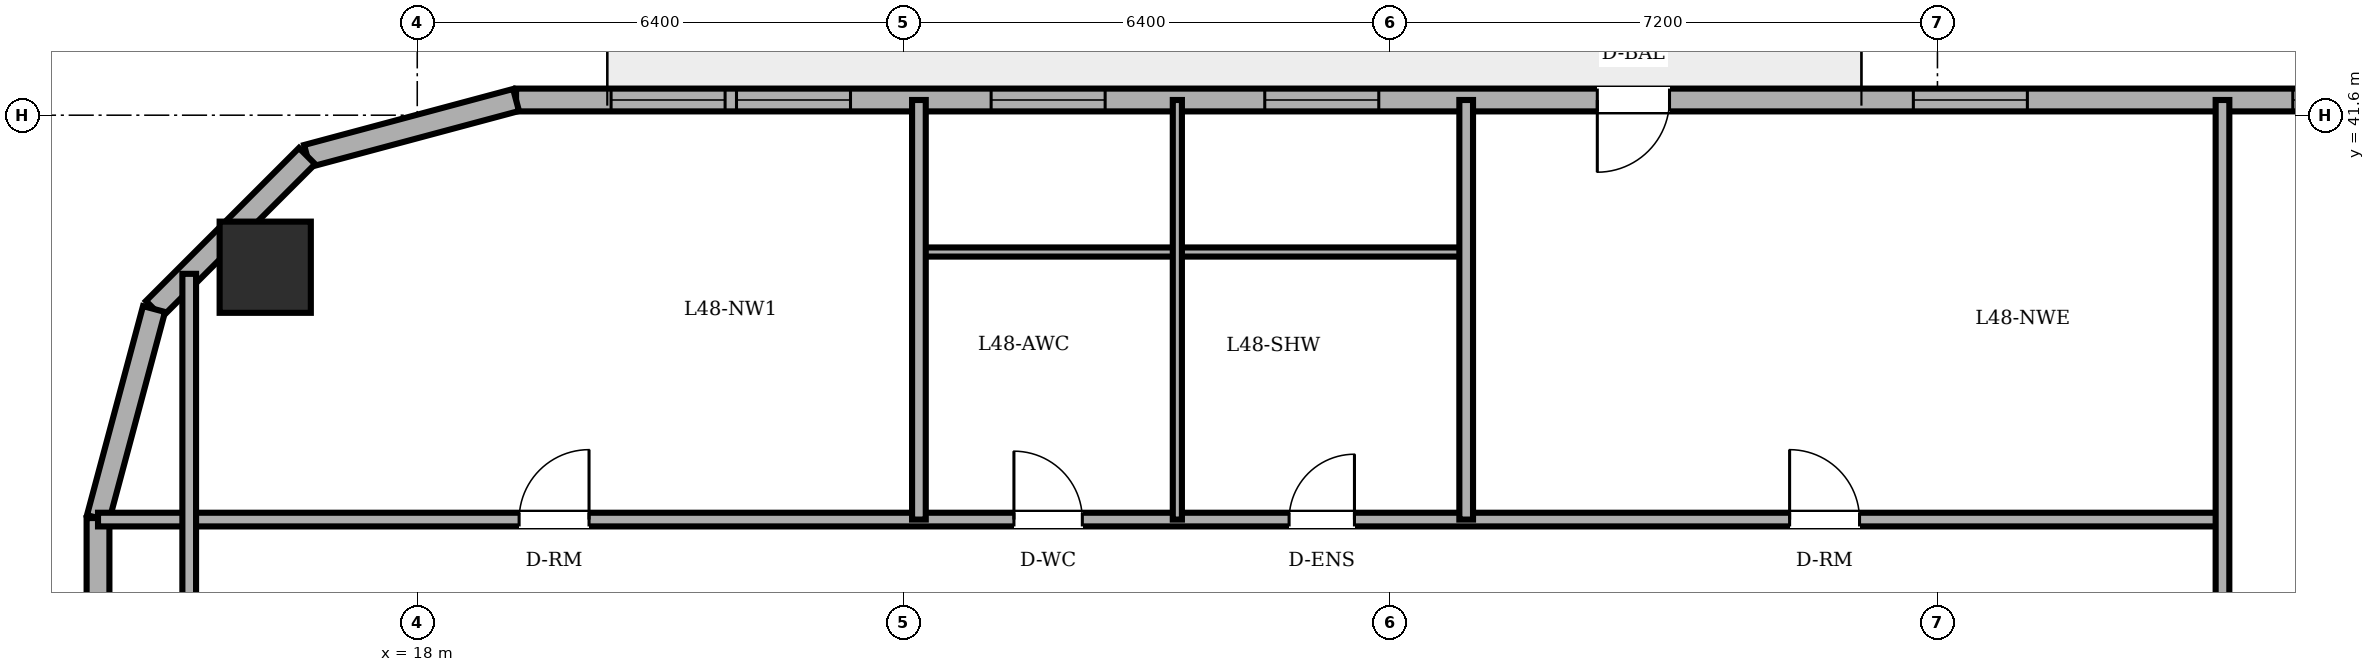
"""IFC4 building model, lengths in metres.
Left out: names, types, materials, properties, quantities, classifications, styles, units other than length and angle.
Written with IfcOpenShell. Run it as: python <this file> out.ifc"""

import sys

from ifc_helpers import new_model, si_unit, direction, frame, frame_2d, origin, origin_2d, place, context, subcontext, project, spatial, rectangle, circle, extrude, element, fill, save


model = new_model("IFC4")
c1 = context("Model", 3, precision=1e-05, world=origin(), true_north=direction((0.0, 1.0)))
c2 = subcontext(c1, "Body", "Model", "MODEL_VIEW")
j1 = project(units=[si_unit("LENGTHUNIT", "METRE"), si_unit("PLANEANGLEUNIT", "RADIAN")], contexts=[c1])
p1 = place(None, origin())
s1 = spatial("IfcSite", under=j1, at=p1, CompositionType="ELEMENT")
p2 = place(p1, origin())
s2 = spatial("IfcBuilding", under=s1, at=p2, CompositionType="ELEMENT")
p3 = place(p2, frame((0.0, 0.0, 183.4)))
s3 = spatial("IfcBuildingStorey", under=s2, at=p3, CompositionType="ELEMENT", Elevation=183.4)
p4 = place(p3, frame((16.0, 39.6, 0.0), z_axis=(0.0, 0.0, 1.0), x_axis=(1.0, 0.0, 0.0)))
e1 = element("IfcColumn", 1, at=p4, inside=s3, PredefinedType="COLUMN", context=c2, shape_type="SweptSolid", body=[
    extrude(circle(Radius=0.6, at=origin_2d()), origin(), (0.0, 0.0, 1.0), 3.6),
])
p5 = place(p3, frame((49.582, 41.8, 0.0), z_axis=(0.0, 0.0, 1.0), x_axis=(-1.0, 0.0, 0.0)))
e2 = element("IfcWall", 2, at=p5, inside=s3, PredefinedType="SOLIDWALL", context=c2, shape_type="SweptSolid", body=[
    extrude(rectangle(XDim=30.282, YDim=0.3, at=frame_2d((15.141, 0.0))), origin(), (0.0, 0.0, 1.0), 3.4),
])
p6 = place(p5, frame((15.107, 0.0, 0.0)))
e3 = element("IfcOpeningElement", 3, at=p6, cuts=e2, PredefinedType="OPENING", context=c2, shape_type="SweptSolid", body=[
    extrude(rectangle(XDim=0.95, YDim=2.2, at=frame_2d((0.475, 1.1))), frame((0.0, 0.16, 0.0), z_axis=(0.0, -1.0, 0.0), x_axis=(1.0, 0.0, 0.0)), (0.0, 0.0, 1.0), 0.32),
])
p7 = place(p5, frame((0.828, 0.0, 0.85)))
e4 = element("IfcOpeningElement", 4, at=p7, cuts=e2, PredefinedType="OPENING", context=c2, shape_type="SweptSolid", body=[
    extrude(rectangle(XDim=1.5, YDim=1.55, at=frame_2d((0.75, 0.775))), frame((0.0, 0.16, 0.0), z_axis=(0.0, -1.0, 0.0), x_axis=(1.0, 0.0, 0.0)), (0.0, 0.0, 1.0), 0.32),
])
p8 = place(p5, frame((3.731, 0.0, 0.85)))
e5 = element("IfcOpeningElement", 5, at=p8, cuts=e2, PredefinedType="OPENING", context=c2, shape_type="SweptSolid", body=[
    extrude(rectangle(XDim=1.5, YDim=1.55, at=frame_2d((0.75, 0.775))), frame((0.0, 0.16, 0.0), z_axis=(0.0, -1.0, 0.0), x_axis=(1.0, 0.0, 0.0)), (0.0, 0.0, 1.0), 0.32),
])
p9 = place(p5, frame((5.407, 0.0, 0.85)))
e6 = element("IfcOpeningElement", 6, at=p9, cuts=e2, PredefinedType="OPENING", context=c2, shape_type="SweptSolid", body=[
    extrude(rectangle(XDim=1.5, YDim=1.55, at=frame_2d((0.75, 0.775))), frame((0.0, 0.16, 0.0), z_axis=(0.0, -1.0, 0.0), x_axis=(1.0, 0.0, 0.0)), (0.0, 0.0, 1.0), 0.32),
])
p10 = place(p5, frame((10.399, 0.0, 0.85)))
e7 = element("IfcOpeningElement", 7, at=p10, cuts=e2, PredefinedType="OPENING", context=c2, shape_type="SweptSolid", body=[
    extrude(rectangle(XDim=1.5, YDim=1.55, at=frame_2d((0.75, 0.775))), frame((0.0, 0.16, 0.0), z_axis=(0.0, -1.0, 0.0), x_axis=(1.0, 0.0, 0.0)), (0.0, 0.0, 1.0), 0.32),
])
p11 = place(p5, frame((18.932, 0.0, 0.85)))
e8 = element("IfcOpeningElement", 8, at=p11, cuts=e2, PredefinedType="OPENING", context=c2, shape_type="SweptSolid", body=[
    extrude(rectangle(XDim=1.5, YDim=1.55, at=frame_2d((0.75, 0.775))), frame((0.0, 0.16, 0.0), z_axis=(0.0, -1.0, 0.0), x_axis=(1.0, 0.0, 0.0)), (0.0, 0.0, 1.0), 0.32),
])
p12 = place(p5, frame((22.532, 0.0, 0.85)))
e9 = element("IfcOpeningElement", 9, at=p12, cuts=e2, PredefinedType="OPENING", context=c2, shape_type="SweptSolid", body=[
    extrude(rectangle(XDim=1.5, YDim=1.55, at=frame_2d((0.75, 0.775))), frame((0.0, 0.16, 0.0), z_axis=(0.0, -1.0, 0.0), x_axis=(1.0, 0.0, 0.0)), (0.0, 0.0, 1.0), 0.32),
])
p13 = place(p5, frame((25.882, 0.0, 0.85)))
e10 = element("IfcOpeningElement", 10, at=p13, cuts=e2, PredefinedType="OPENING", context=c2, shape_type="SweptSolid", body=[
    extrude(rectangle(XDim=1.5, YDim=1.55, at=frame_2d((0.75, 0.775))), frame((0.0, 0.16, 0.0), z_axis=(0.0, -1.0, 0.0), x_axis=(1.0, 0.0, 0.0)), (0.0, 0.0, 1.0), 0.32),
])
p14 = place(p5, frame((27.532, 0.0, 0.85)))
e11 = element("IfcOpeningElement", 11, at=p14, cuts=e2, PredefinedType="OPENING", context=c2, shape_type="SweptSolid", body=[
    extrude(rectangle(XDim=1.5, YDim=1.55, at=frame_2d((0.75, 0.775))), frame((0.0, 0.16, 0.0), z_axis=(0.0, -1.0, 0.0), x_axis=(1.0, 0.0, 0.0)), (0.0, 0.0, 1.0), 0.32),
])
p15 = place(p3, frame((19.3, 41.8, 0.0), z_axis=(0.0, 0.0, 1.0), x_axis=(-0.965908238586, -0.258884674387, 0.0)))
e12 = element("IfcWall", 12, at=p15, inside=s3, PredefinedType="SOLIDWALL", context=c2, shape_type="SweptSolid", body=[
    extrude(rectangle(XDim=2.847, YDim=0.3, at=frame_2d((1.424, 0.0))), origin(), (0.0, 0.0, 1.0), 3.4),
])
p16 = place(p3, frame((16.55, 41.063, 0.0), z_axis=(0.0, 0.0, 1.0), x_axis=(-0.707106781187, -0.707106781187, 0.0)))
e13 = element("IfcWall", 13, at=p16, inside=s3, PredefinedType="SOLIDWALL", context=c2, shape_type="SweptSolid", body=[
    extrude(rectangle(XDim=2.847, YDim=0.3, at=frame_2d((1.423, 0.0))), origin(), (0.0, 0.0, 1.0), 3.4),
])
p17 = place(p3, frame((14.537, 39.05, 0.0), z_axis=(0.0, 0.0, 1.0), x_axis=(-0.258884674387, -0.965908238586, 0.0)))
e14 = element("IfcWall", 14, at=p17, inside=s3, PredefinedType="SOLIDWALL", context=c2, shape_type="SweptSolid", body=[
    extrude(rectangle(XDim=2.847, YDim=0.3, at=frame_2d((1.424, 0.0))), origin(), (0.0, 0.0, 1.0), 3.4),
])
p18 = place(p3, frame((13.8, 36.3, 0.0), z_axis=(0.0, 0.0, 1.0), x_axis=(0.0, -1.0, 0.0)))
e15 = element("IfcWall", 15, at=p18, inside=s3, PredefinedType="SOLIDWALL", context=c2, shape_type="SweptSolid", body=[
    extrude(rectangle(XDim=24.6, YDim=0.3, at=frame_2d((12.3, 0.0))), origin(), (0.0, 0.0, 1.0), 3.4),
])
p19 = place(p18, frame((5.003, 0.0, 0.85)))
e16 = element("IfcOpeningElement", 16, at=p19, cuts=e15, PredefinedType="OPENING", context=c2, shape_type="SweptSolid", body=[
    extrude(rectangle(XDim=1.5, YDim=1.55, at=frame_2d((0.75, 0.775))), frame((0.0, 0.16, 0.0), z_axis=(0.0, -1.0, 0.0), x_axis=(1.0, 0.0, 0.0)), (0.0, 0.0, 1.0), 0.32),
])
p20 = place(p18, frame((8.277, 0.0, 0.85)))
e17 = element("IfcOpeningElement", 17, at=p20, cuts=e15, PredefinedType="OPENING", context=c2, shape_type="SweptSolid", body=[
    extrude(rectangle(XDim=1.5, YDim=1.55, at=frame_2d((0.75, 0.775))), frame((0.0, 0.16, 0.0), z_axis=(0.0, -1.0, 0.0), x_axis=(1.0, 0.0, 0.0)), (0.0, 0.0, 1.0), 0.32),
])
p21 = place(p18, frame((14.823, 0.0, 0.85)))
e18 = element("IfcOpeningElement", 18, at=p21, cuts=e15, PredefinedType="OPENING", context=c2, shape_type="SweptSolid", body=[
    extrude(rectangle(XDim=1.5, YDim=1.55, at=frame_2d((0.75, 0.775))), frame((0.0, 0.16, 0.0), z_axis=(0.0, -1.0, 0.0), x_axis=(1.0, 0.0, 0.0)), (0.0, 0.0, 1.0), 0.32),
])
p22 = place(p18, frame((18.097, 0.0, 0.85)))
e19 = element("IfcOpeningElement", 19, at=p22, cuts=e15, PredefinedType="OPENING", context=c2, shape_type="SweptSolid", body=[
    extrude(rectangle(XDim=1.5, YDim=1.55, at=frame_2d((0.75, 0.775))), frame((0.0, 0.16, 0.0), z_axis=(0.0, -1.0, 0.0), x_axis=(1.0, 0.0, 0.0)), (0.0, 0.0, 1.0), 0.32),
])
p23 = place(p3, frame((13.8, 36.28, 0.0), z_axis=(0.0, 0.0, 1.0), x_axis=(1.0, 0.0, 0.0)))
e20 = element("IfcWall", 20, at=p23, inside=s3, PredefinedType="PARTITIONING", context=c2, shape_type="SweptSolid", body=[
    extrude(rectangle(XDim=27.95, YDim=0.18, at=frame_2d((13.975, 0.0))), origin(), (0.0, 0.0, 1.0), 3.4),
])
p24 = place(p23, frame((12.05, 0.0, 0.0)))
e21 = element("IfcOpeningElement", 21, at=p24, cuts=e20, PredefinedType="OPENING", context=c2, shape_type="SweptSolid", body=[
    extrude(rectangle(XDim=0.9, YDim=2.1, at=frame_2d((0.45, 1.05))), frame((0.0, 0.1, 0.0), z_axis=(0.0, -1.0, 0.0), x_axis=(1.0, 0.0, 0.0)), (0.0, 0.0, 1.0), 0.2),
])
p25 = place(p23, frame((15.67, 0.0, 0.0)))
e22 = element("IfcOpeningElement", 22, at=p25, cuts=e20, PredefinedType="OPENING", context=c2, shape_type="SweptSolid", body=[
    extrude(rectangle(XDim=0.86, YDim=2.1, at=frame_2d((0.43, 1.05))), frame((0.0, 0.1, 0.0), z_axis=(0.0, -1.0, 0.0), x_axis=(1.0, 0.0, 0.0)), (0.0, 0.0, 1.0), 0.2),
])
p26 = place(p23, frame((5.54, 0.0, 0.0)))
e23 = element("IfcOpeningElement", 23, at=p26, cuts=e20, PredefinedType="OPENING", context=c2, shape_type="SweptSolid", body=[
    extrude(rectangle(XDim=0.92, YDim=2.1, at=frame_2d((0.46, 1.05))), frame((0.0, 0.1, 0.0), z_axis=(0.0, -1.0, 0.0), x_axis=(1.0, 0.0, 0.0)), (0.0, 0.0, 1.0), 0.2),
])
p27 = place(p23, frame((22.255, 0.0, 0.0)))
e24 = element("IfcOpeningElement", 24, at=p27, cuts=e20, PredefinedType="OPENING", context=c2, shape_type="SweptSolid", body=[
    extrude(rectangle(XDim=0.92, YDim=2.1, at=frame_2d((0.46, 1.05))), frame((0.0, 0.1, 0.0), z_axis=(0.0, -1.0, 0.0), x_axis=(1.0, 0.0, 0.0)), (0.0, 0.0, 1.0), 0.2),
])
p28 = place(p3, frame((24.6, 39.8, 0.0), z_axis=(0.0, 0.0, 1.0), x_axis=(1.0, 0.0, 0.0)))
e25 = element("IfcWall", 25, at=p28, inside=s3, PredefinedType="PARTITIONING", context=c2, shape_type="SweptSolid", body=[
    extrude(rectangle(XDim=7.2, YDim=0.12, at=frame_2d((3.6, 0.0))), origin(), (0.0, 0.0, 1.0), 2.882),
])
p29 = place(p3, frame((15.0, 33.82, 0.0), z_axis=(0.0, 0.0, 1.0), x_axis=(0.0, 1.0, 0.0)))
e26 = element("IfcWall", 26, at=p29, inside=s3, PredefinedType="PARTITIONING", context=c2, shape_type="SweptSolid", body=[
    extrude(rectangle(XDim=5.693, YDim=0.18, at=frame_2d((2.846, 0.0))), origin(), (0.0, 0.0, 1.0), 3.4),
])
p30 = place(p3, frame((24.6, 36.28, 0.0), z_axis=(0.0, 0.0, 1.0), x_axis=(0.0, 1.0, 0.0)))
e27 = element("IfcWall", 27, at=p30, inside=s3, PredefinedType="PARTITIONING", context=c2, shape_type="SweptSolid", body=[
    extrude(rectangle(XDim=5.52, YDim=0.18, at=frame_2d((2.76, 0.0))), origin(), (0.0, 0.0, 1.0), 3.4),
])
p31 = place(p3, frame((28.0, 36.28, 0.0), z_axis=(0.0, 0.0, 1.0), x_axis=(0.0, 1.0, 0.0)))
e28 = element("IfcWall", 28, at=p31, inside=s3, PredefinedType="PARTITIONING", context=c2, shape_type="SweptSolid", body=[
    extrude(rectangle(XDim=5.52, YDim=0.12, at=frame_2d((2.76, 0.0))), origin(), (0.0, 0.0, 1.0), 3.4),
])
p32 = place(p3, frame((31.8, 36.28, 0.0), z_axis=(0.0, 0.0, 1.0), x_axis=(0.0, 1.0, 0.0)))
e29 = element("IfcWall", 29, at=p32, inside=s3, PredefinedType="PARTITIONING", context=c2, shape_type="SweptSolid", body=[
    extrude(rectangle(XDim=5.52, YDim=0.18, at=frame_2d((2.76, 0.0))), origin(), (0.0, 0.0, 1.0), 3.4),
])
p33 = place(p3, frame((41.75, 25.18, 0.0), z_axis=(0.0, 0.0, 1.0), x_axis=(0.0, 1.0, 0.0)))
e30 = element("IfcWall", 30, at=p33, inside=s3, PredefinedType="PARTITIONING", context=c2, shape_type="SweptSolid", body=[
    extrude(rectangle(XDim=16.62, YDim=0.18, at=frame_2d((8.31, 0.0))), origin(), (0.0, 0.0, 1.0), 3.4),
])
p34 = place(p33, frame((5.35, 0.0, 0.0)))
e31 = element("IfcOpeningElement", 31, at=p34, cuts=e30, PredefinedType="OPENING", context=c2, shape_type="SweptSolid", body=[
    extrude(rectangle(XDim=0.92, YDim=2.1, at=frame_2d((0.46, 1.05))), frame((0.0, 0.1, 0.0), z_axis=(0.0, -1.0, 0.0), x_axis=(1.0, 0.0, 0.0)), (0.0, 0.0, 1.0), 0.2),
])
p35 = place(p6, origin())
e32 = element("IfcDoor", 32, at=p35, inside=s3, OperationType="SINGLE_SWING_RIGHT", PredefinedType="DOOR", context=c2, shape_type="SweptSolid", body=[
    extrude(rectangle(XDim=0.95, YDim=2.2, at=frame_2d((0.475, 1.1))), frame((0.0, 0.025, 0.0), z_axis=(0.0, -1.0, 0.0), x_axis=(1.0, 0.0, 0.0)), (0.0, 0.0, 1.0), 0.05),
])
fill(e3, e32)
p36 = place(p9, origin())
e33 = element("IfcWindow", 33, at=p36, inside=s3, PartitioningType="DOUBLE_PANEL_VERTICAL", PredefinedType="WINDOW", context=c2, shape_type="SweptSolid", body=[
    extrude(rectangle(XDim=1.5, YDim=1.55, at=frame_2d((0.75, 0.775))), frame((0.0, 0.03, 0.0), z_axis=(0.0, -1.0, 0.0), x_axis=(1.0, 0.0, 0.0)), (0.0, 0.0, 1.0), 0.06),
])
fill(e6, e33)
p37 = place(p10, origin())
e34 = element("IfcWindow", 34, at=p37, inside=s3, PartitioningType="DOUBLE_PANEL_VERTICAL", PredefinedType="WINDOW", context=c2, shape_type="SweptSolid", body=[
    extrude(rectangle(XDim=1.5, YDim=1.55, at=frame_2d((0.75, 0.775))), frame((0.0, 0.03, 0.0), z_axis=(0.0, -1.0, 0.0), x_axis=(1.0, 0.0, 0.0)), (0.0, 0.0, 1.0), 0.06),
])
fill(e7, e34)
p38 = place(p11, origin())
e35 = element("IfcWindow", 35, at=p38, inside=s3, PartitioningType="DOUBLE_PANEL_VERTICAL", PredefinedType="WINDOW", context=c2, shape_type="SweptSolid", body=[
    extrude(rectangle(XDim=1.5, YDim=1.55, at=frame_2d((0.75, 0.775))), frame((0.0, 0.03, 0.0), z_axis=(0.0, -1.0, 0.0), x_axis=(1.0, 0.0, 0.0)), (0.0, 0.0, 1.0), 0.06),
])
fill(e8, e35)
p39 = place(p12, origin())
e36 = element("IfcWindow", 36, at=p39, inside=s3, PartitioningType="DOUBLE_PANEL_VERTICAL", PredefinedType="WINDOW", context=c2, shape_type="SweptSolid", body=[
    extrude(rectangle(XDim=1.5, YDim=1.55, at=frame_2d((0.75, 0.775))), frame((0.0, 0.03, 0.0), z_axis=(0.0, -1.0, 0.0), x_axis=(1.0, 0.0, 0.0)), (0.0, 0.0, 1.0), 0.06),
])
fill(e9, e36)
p40 = place(p13, origin())
e37 = element("IfcWindow", 37, at=p40, inside=s3, PartitioningType="DOUBLE_PANEL_VERTICAL", PredefinedType="WINDOW", context=c2, shape_type="SweptSolid", body=[
    extrude(rectangle(XDim=1.5, YDim=1.55, at=frame_2d((0.75, 0.775))), frame((0.0, 0.03, 0.0), z_axis=(0.0, -1.0, 0.0), x_axis=(1.0, 0.0, 0.0)), (0.0, 0.0, 1.0), 0.06),
])
fill(e10, e37)
p41 = place(p14, origin())
e38 = element("IfcWindow", 38, at=p41, inside=s3, PartitioningType="DOUBLE_PANEL_VERTICAL", PredefinedType="WINDOW", context=c2, shape_type="SweptSolid", body=[
    extrude(rectangle(XDim=1.5, YDim=1.55, at=frame_2d((0.75, 0.775))), frame((0.0, 0.03, 0.0), z_axis=(0.0, -1.0, 0.0), x_axis=(1.0, 0.0, 0.0)), (0.0, 0.0, 1.0), 0.06),
])
fill(e11, e38)
p42 = place(p24, origin())
e39 = element("IfcDoor", 39, at=p42, inside=s3, OperationType="SINGLE_SWING_LEFT", PredefinedType="DOOR", context=c2, shape_type="SweptSolid", body=[
    extrude(rectangle(XDim=0.9, YDim=2.1, at=frame_2d((0.45, 1.05))), frame((0.0, 0.025, 0.0), z_axis=(0.0, -1.0, 0.0), x_axis=(1.0, 0.0, 0.0)), (0.0, 0.0, 1.0), 0.05),
])
fill(e21, e39)
p43 = place(p25, origin())
e40 = element("IfcDoor", 40, at=p43, inside=s3, OperationType="SINGLE_SWING_RIGHT", PredefinedType="DOOR", context=c2, shape_type="SweptSolid", body=[
    extrude(rectangle(XDim=0.86, YDim=2.1, at=frame_2d((0.43, 1.05))), frame((0.0, 0.025, 0.0), z_axis=(0.0, -1.0, 0.0), x_axis=(1.0, 0.0, 0.0)), (0.0, 0.0, 1.0), 0.05),
])
fill(e22, e40)
p44 = place(p26, origin())
e41 = element("IfcDoor", 41, at=p44, inside=s3, OperationType="SINGLE_SWING_RIGHT", PredefinedType="DOOR", context=c2, shape_type="SweptSolid", body=[
    extrude(rectangle(XDim=0.92, YDim=2.1, at=frame_2d((0.46, 1.05))), frame((0.0, 0.025, 0.0), z_axis=(0.0, -1.0, 0.0), x_axis=(1.0, 0.0, 0.0)), (0.0, 0.0, 1.0), 0.05),
])
fill(e23, e41)
p45 = place(p27, origin())
e42 = element("IfcDoor", 42, at=p45, inside=s3, OperationType="SINGLE_SWING_LEFT", PredefinedType="DOOR", context=c2, shape_type="SweptSolid", body=[
    extrude(rectangle(XDim=0.92, YDim=2.1, at=frame_2d((0.46, 1.05))), frame((0.0, 0.025, 0.0), z_axis=(0.0, -1.0, 0.0), x_axis=(1.0, 0.0, 0.0)), (0.0, 0.0, 1.0), 0.05),
])
fill(e24, e42)
save(model, sys.argv[1])
